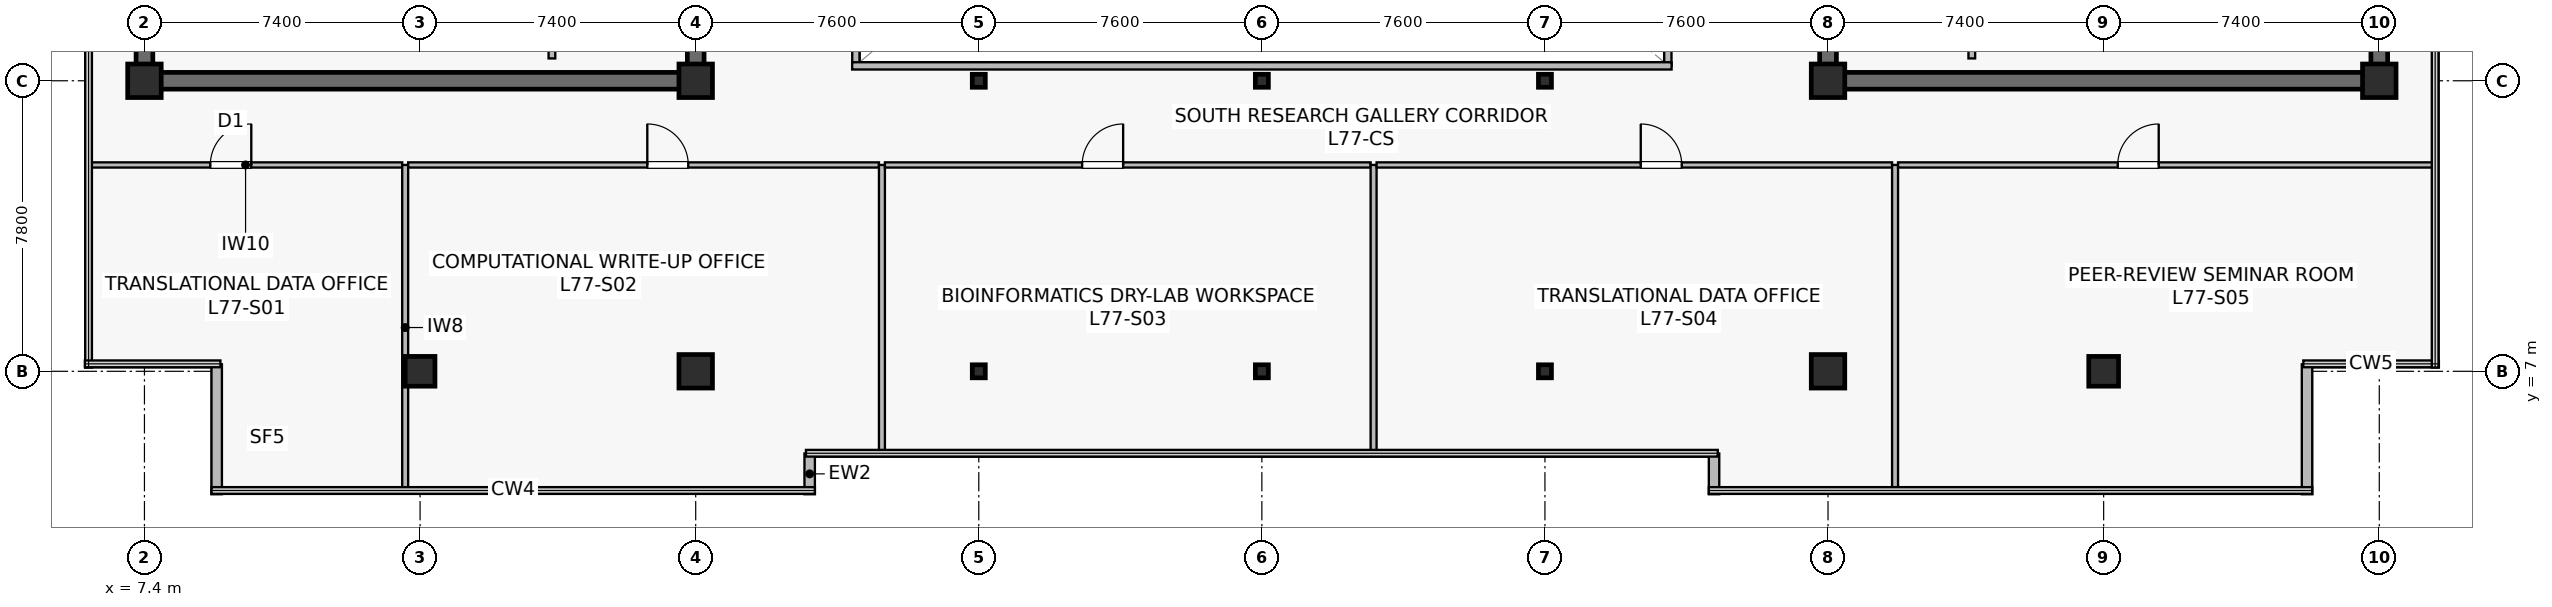
"""IFC4 building model, lengths in metres.
Left out: names, types, materials, properties, quantities, classifications, styles, units other than length and angle.
Written with IfcOpenShell. Run it as: python <this file> out.ifc"""

import sys

from ifc_helpers import new_model, si_unit, direction, frame, frame_2d, origin, origin_2d, place, context, subcontext, project, spatial, rectangle, i_section, extrude, source, transform, mapped, element, fill, save


model = new_model("IFC4")
c1 = context("Model", 3, precision=1e-05, world=origin(), true_north=direction((0.0, 1.0)))
c2 = subcontext(c1, "Body", "Model", "MODEL_VIEW")
j1 = project(units=[si_unit("LENGTHUNIT", "METRE"), si_unit("PLANEANGLEUNIT", "RADIAN")], contexts=[c1])
p1 = place(None, origin())
s1 = spatial("IfcSite", under=j1, at=p1, CompositionType="ELEMENT")
p2 = place(p1, origin())
s2 = spatial("IfcBuilding", under=s1, at=p2, CompositionType="ELEMENT")
p3 = place(p2, frame((0.0, 0.0, 322.8)))
s3 = spatial("IfcBuildingStorey", under=s2, at=p3, CompositionType="ELEMENT", Elevation=322.8)
p4 = place(p3, frame((7.175, 14.8, 0.0), z_axis=(0.0, 0.0, 1.0), x_axis=(1.0, 0.0, 0.0)))
e1 = element("IfcWall", 1, at=p4, inside=s3, PredefinedType="SHEAR", context=c2, shape_type="SweptSolid", body=[
    extrude(rectangle(XDim=15.25, YDim=0.45, at=frame_2d((7.625, 0.0))), origin(), (0.0, 0.0, 1.0), 3.92),
])
p5 = place(p3, frame((7.4, 15.025, 0.0), z_axis=(0.0, 0.0, 1.0), x_axis=(0.0, 1.0, 0.0)))
e2 = element("IfcWall", 2, at=p5, inside=s3, PredefinedType="SHEAR", context=c2, shape_type="SweptSolid", body=[
    extrude(rectangle(XDim=18.55, YDim=0.45, at=frame_2d((9.275, 0.0))), origin(), (0.0, 0.0, 1.0), 3.92),
])
p6 = place(p3, frame((22.2, 15.025, 0.0), z_axis=(0.0, 0.0, 1.0), x_axis=(0.0, 1.0, 0.0)))
e3 = element("IfcWall", 3, at=p6, inside=s3, PredefinedType="SHEAR", context=c2, shape_type="SweptSolid", body=[
    extrude(rectangle(XDim=18.55, YDim=0.45, at=frame_2d((9.275, 0.0))), origin(), (0.0, 0.0, 1.0), 3.92),
])
p7 = place(p6, frame((3.525, 0.0, 0.0)))
e4 = element("IfcOpeningElement", 4, at=p7, cuts=e3, PredefinedType="OPENING", context=c2, shape_type="SweptSolid", body=[
    extrude(rectangle(XDim=1.42, YDim=2.2, at=frame_2d((0.71, 1.1))), frame((0.0, 0.235, 0.0), z_axis=(0.0, -1.0, 0.0), x_axis=(1.0, 0.0, 0.0)), (0.0, 0.0, 1.0), 0.47),
])
p8 = place(p3, frame((52.375, 14.8, 0.0), z_axis=(0.0, 0.0, 1.0), x_axis=(1.0, 0.0, 0.0)))
e5 = element("IfcWall", 5, at=p8, inside=s3, PredefinedType="SHEAR", context=c2, shape_type="SweptSolid", body=[
    extrude(rectangle(XDim=15.25, YDim=0.45, at=frame_2d((7.625, 0.0))), origin(), (0.0, 0.0, 1.0), 3.92),
])
p9 = place(p3, frame((52.6, 15.025, 0.0), z_axis=(0.0, 0.0, 1.0), x_axis=(0.0, 1.0, 0.0)))
e6 = element("IfcWall", 6, at=p9, inside=s3, PredefinedType="SHEAR", context=c2, shape_type="SweptSolid", body=[
    extrude(rectangle(XDim=18.55, YDim=0.45, at=frame_2d((9.275, 0.0))), origin(), (0.0, 0.0, 1.0), 3.92),
])
p10 = place(p9, frame((3.525, 0.0, 0.0)))
e7 = element("IfcOpeningElement", 7, at=p10, cuts=e6, PredefinedType="OPENING", context=c2, shape_type="SweptSolid", body=[
    extrude(rectangle(XDim=1.42, YDim=2.2, at=frame_2d((0.71, 1.1))), frame((0.0, 0.235, 0.0), z_axis=(0.0, -1.0, 0.0), x_axis=(1.0, 0.0, 0.0)), (0.0, 0.0, 1.0), 0.47),
])
p11 = place(p3, frame((67.4, 15.025, 0.0), z_axis=(0.0, 0.0, 1.0), x_axis=(0.0, 1.0, 0.0)))
e8 = element("IfcWall", 8, at=p11, inside=s3, PredefinedType="SHEAR", context=c2, shape_type="SweptSolid", body=[
    extrude(rectangle(XDim=18.55, YDim=0.45, at=frame_2d((9.275, 0.0))), origin(), (0.0, 0.0, 1.0), 3.92),
])
m1 = source(origin(), c2, "Body", "SweptSolid", [
    extrude(rectangle(XDim=0.8, YDim=0.8, at=origin_2d()), origin(), (0.0, 0.0, 1.0), 4.2),
])
p12 = place(p3, frame((14.8, 7.0, 0.0), z_axis=(0.0, 0.0, 1.0), x_axis=(1.0, 0.0, 0.0)))
e9 = element("IfcColumn", 9, at=p12, inside=s3, PredefinedType="COLUMN", context=c2, shape_type="MappedRepresentation", body=[
    mapped(m1, transform((0.0, 0.0, 0.0), scale=1.0)),
])
m2 = source(origin(), c2, "Body", "SweptSolid", [
    extrude(rectangle(XDim=0.9, YDim=0.9, at=origin_2d()), origin(), (0.0, 0.0, 1.0), 4.2),
])
for number, where, z_axis, x_axis in (
    (10, (22.2, 7.0, 0.0), (0.0, 0.0, 1.0), (1.0, 0.0, 0.0)),
    (11, (7.4, 14.8, 0.0), (0.0, 0.0, 1.0), (1.0, 0.0, 0.0)),
    (12, (22.2, 14.8, 0.0), (0.0, 0.0, 1.0), (1.0, 0.0, 0.0)),
    (13, (52.6, 7.0, 0.0), (0.0, 0.0, 1.0), (1.0, 0.0, 0.0)),
):
    element("IfcColumn", number, at=place(p3, frame(where, z_axis=z_axis, x_axis=x_axis)), inside=s3, PredefinedType="COLUMN", context=c2, shape_type="MappedRepresentation", body=[
        mapped(m2, transform((0.0, 0.0, 0.0), scale=1.0)),
    ])
p13 = place(p3, frame((60.0, 7.0, 0.0), z_axis=(0.0, 0.0, 1.0), x_axis=(1.0, 0.0, 0.0)))
e14 = element("IfcColumn", 14, at=p13, inside=s3, PredefinedType="COLUMN", context=c2, shape_type="MappedRepresentation", body=[
    mapped(m1, transform((0.0, 0.0, 0.0), scale=1.0)),
])
for number, where, z_axis, x_axis in (
    (15, (52.6, 14.8, 0.0), (0.0, 0.0, 1.0), (1.0, 0.0, 0.0)),
    (16, (67.4, 14.8, 0.0), (0.0, 0.0, 1.0), (1.0, 0.0, 0.0)),
):
    element("IfcColumn", number, at=place(p3, frame(where, z_axis=z_axis, x_axis=x_axis)), inside=s3, PredefinedType="COLUMN", context=c2, shape_type="MappedRepresentation", body=[
        mapped(m2, transform((0.0, 0.0, 0.0), scale=1.0)),
    ])
m3 = source(origin(), c2, "Body", "SweptSolid", [
    extrude(i_section(OverallWidth=0.35, OverallDepth=0.35, WebThickness=0.012, FlangeThickness=0.019, at=origin_2d()), origin(), (0.0, 0.0, 1.0), 4.2),
])
for number, where, z_axis, x_axis in (
    (17, (29.8, 7.0, 0.0), (0.0, 0.0, 1.0), (1.0, 0.0, 0.0)),
    (18, (29.8, 14.8, 0.0), (0.0, 0.0, 1.0), (1.0, 0.0, 0.0)),
    (19, (37.4, 7.0, 0.0), (0.0, 0.0, 1.0), (1.0, 0.0, 0.0)),
    (20, (37.4, 14.8, 0.0), (0.0, 0.0, 1.0), (1.0, 0.0, 0.0)),
    (21, (45.0, 7.0, 0.0), (0.0, 0.0, 1.0), (1.0, 0.0, 0.0)),
    (22, (45.0, 14.8, 0.0), (0.0, 0.0, 1.0), (1.0, 0.0, 0.0)),
):
    element("IfcColumn", number, at=place(p3, frame(where, z_axis=z_axis, x_axis=x_axis)), inside=s3, PredefinedType="COLUMN", context=c2, shape_type="MappedRepresentation", body=[
        mapped(m3, transform((0.0, 0.0, 0.0), scale=1.0)),
    ])
for number, where, z_axis, x_axis in (
    (23, (25.26, 3.7, 0.0), (0.0, 0.0, 1.0), (0.0, 1.0, 0.0)),
    (24, (49.54, 4.793, 0.0), (0.0, 0.0, 1.0), (0.0, -1.0, 0.0)),
):
    element("IfcWall", number, at=place(p3, frame(where, z_axis=z_axis, x_axis=x_axis)), inside=s3, PredefinedType="STANDARD", context=c2, shape_type="SweptSolid", body=[
        extrude(rectangle(XDim=1.093, YDim=0.28, at=frame_2d((0.546, 0.0))), origin(), (0.0, 0.0, 1.0), 3.92),
    ])
for number, where, z_axis, x_axis in (
    (25, (65.46, 3.7, 0.0), (0.0, 0.0, 1.0), (0.0, 1.0, 0.0)),
    (26, (9.34, 7.188, 0.0), (0.0, 0.0, 1.0), (0.0, -1.0, 0.0)),
):
    element("IfcWall", number, at=place(p3, frame(where, z_axis=z_axis, x_axis=x_axis)), inside=s3, PredefinedType="STANDARD", context=c2, shape_type="SweptSolid", body=[
        extrude(rectangle(XDim=3.488, YDim=0.28, at=frame_2d((1.744, 0.0))), origin(), (0.0, 0.0, 1.0), 3.92),
    ])
for number, where, z_axis, x_axis in (
    (27, (18.34, 15.4, 0.0), (0.0, 0.0, 1.0), (0.0, 1.0, 0.0)),
    (28, (56.46, 15.4, 0.0), (0.0, 0.0, 1.0), (0.0, 1.0, 0.0)),
):
    element("IfcWall", number, at=place(p3, frame(where, z_axis=z_axis, x_axis=x_axis)), inside=s3, PredefinedType="SOLIDWALL", context=c2, shape_type="SweptSolid", body=[
        extrude(rectangle(XDim=2.4, YDim=0.18, at=frame_2d((1.2, 0.0))), origin(), (0.0, 0.0, 1.0), 3.92),
    ])
p14 = place(p3, frame((26.5, 15.2, 0.0), z_axis=(0.0, 0.0, 1.0), x_axis=(0.0, 1.0, 0.0)))
e29 = element("IfcWall", 29, at=p14, inside=s3, PredefinedType="SOLIDWALL", context=c2, shape_type="SweptSolid", body=[
    extrude(rectangle(XDim=18.2, YDim=0.195, at=frame_2d((9.1, 0.0))), origin(), (0.0, 0.0, 1.0), 3.92),
])
p15 = place(p14, frame((1.8, 0.0, 0.9)))
e30 = element("IfcOpeningElement", 30, at=p15, cuts=e29, PredefinedType="OPENING", context=c2, shape_type="SweptSolid", body=[
    extrude(rectangle(XDim=1.2, YDim=1.35, at=frame_2d((0.6, 0.675))), frame((0.0, 0.107, 0.0), z_axis=(0.0, -1.0, 0.0), x_axis=(1.0, 0.0, 0.0)), (0.0, 0.0, 1.0), 0.215),
])
p16 = place(p14, frame((13.2, 0.0, 0.9)))
e31 = element("IfcOpeningElement", 31, at=p16, cuts=e29, PredefinedType="OPENING", context=c2, shape_type="SweptSolid", body=[
    extrude(rectangle(XDim=1.2, YDim=1.35, at=frame_2d((0.6, 0.675))), frame((0.0, 0.107, 0.0), z_axis=(0.0, -1.0, 0.0), x_axis=(1.0, 0.0, 0.0)), (0.0, 0.0, 1.0), 0.215),
])
p17 = place(p3, frame((48.3, 15.2, 0.0), z_axis=(0.0, 0.0, 1.0), x_axis=(0.0, 1.0, 0.0)))
e32 = element("IfcWall", 32, at=p17, inside=s3, PredefinedType="SOLIDWALL", context=c2, shape_type="SweptSolid", body=[
    extrude(rectangle(XDim=18.2, YDim=0.195, at=frame_2d((9.1, 0.0))), origin(), (0.0, 0.0, 1.0), 3.92),
])
p18 = place(p17, frame((1.8, 0.0, 0.9)))
e33 = element("IfcOpeningElement", 33, at=p18, cuts=e32, PredefinedType="OPENING", context=c2, shape_type="SweptSolid", body=[
    extrude(rectangle(XDim=1.2, YDim=1.35, at=frame_2d((0.6, 0.675))), frame((0.0, 0.107, 0.0), z_axis=(0.0, -1.0, 0.0), x_axis=(1.0, 0.0, 0.0)), (0.0, 0.0, 1.0), 0.215),
])
p19 = place(p17, frame((13.2, 0.0, 0.9)))
e34 = element("IfcOpeningElement", 34, at=p19, cuts=e32, PredefinedType="OPENING", context=c2, shape_type="SweptSolid", body=[
    extrude(rectangle(XDim=1.2, YDim=1.35, at=frame_2d((0.6, 0.675))), frame((0.0, 0.107, 0.0), z_axis=(0.0, -1.0, 0.0), x_axis=(1.0, 0.0, 0.0)), (0.0, 0.0, 1.0), 0.215),
])
p20 = place(p3, frame((26.4, 15.2, 0.0), z_axis=(0.0, 0.0, 1.0), x_axis=(1.0, 0.0, 0.0)))
e35 = element("IfcWall", 35, at=p20, inside=s3, PredefinedType="SOLIDWALL", context=c2, shape_type="SweptSolid", body=[
    extrude(rectangle(XDim=22.0, YDim=0.195, at=frame_2d((11.0, 0.0))), origin(), (0.0, 0.0, 1.0), 3.92),
])
p21 = place(p3, frame((5.91, 12.54, 0.0), z_axis=(0.0, 0.0, 1.0), x_axis=(1.0, 0.0, 0.0)))
e36 = element("IfcWall", 36, at=p21, inside=s3, PredefinedType="PARTITIONING", context=c2, shape_type="SweptSolid", body=[
    extrude(rectangle(XDim=8.41, YDim=0.14, at=frame_2d((4.205, 0.0))), origin(), (0.0, 0.0, 1.0), 3.92),
])
p22 = place(p21, frame((3.258, 0.0, 0.0)))
e37 = element("IfcOpeningElement", 37, at=p22, cuts=e36, PredefinedType="OPENING", context=c2, shape_type="SweptSolid", body=[
    extrude(rectangle(XDim=1.1, YDim=2.18, at=frame_2d((0.55, 1.09))), frame((0.0, 0.08, 0.0), z_axis=(0.0, -1.0, 0.0), x_axis=(1.0, 0.0, 0.0)), (0.0, 0.0, 1.0), 0.16),
])
p23 = place(p3, frame((14.4, 3.81, 0.0), z_axis=(0.0, 0.0, 1.0), x_axis=(0.0, 1.0, 0.0)))
e38 = element("IfcWall", 38, at=p23, inside=s3, PredefinedType="PARTITIONING", context=c2, shape_type="SweptSolid", body=[
    extrude(rectangle(XDim=8.73, YDim=0.16, at=frame_2d((4.365, 0.0))), origin(), (0.0, 0.0, 1.0), 3.92),
])
p24 = place(p3, frame((14.48, 12.54, 0.0), z_axis=(0.0, 0.0, 1.0), x_axis=(1.0, 0.0, 0.0)))
e39 = element("IfcWall", 39, at=p24, inside=s3, PredefinedType="PARTITIONING", context=c2, shape_type="SweptSolid", body=[
    extrude(rectangle(XDim=12.64, YDim=0.14, at=frame_2d((6.32, 0.0))), origin(), (0.0, 0.0, 1.0), 3.317),
])
p25 = place(p24, frame((6.42, 0.0, 0.0)))
e40 = element("IfcOpeningElement", 40, at=p25, cuts=e39, PredefinedType="OPENING", context=c2, shape_type="SweptSolid", body=[
    extrude(rectangle(XDim=1.1, YDim=2.18, at=frame_2d((0.55, 1.09))), frame((0.0, 0.08, 0.0), z_axis=(0.0, -1.0, 0.0), x_axis=(1.0, 0.0, 0.0)), (0.0, 0.0, 1.0), 0.16),
])
p26 = place(p3, frame((27.2, 4.81, 0.0), z_axis=(0.0, 0.0, 1.0), x_axis=(0.0, 1.0, 0.0)))
e41 = element("IfcWall", 41, at=p26, inside=s3, PredefinedType="PARTITIONING", context=c2, shape_type="SweptSolid", body=[
    extrude(rectangle(XDim=7.73, YDim=0.16, at=frame_2d((3.865, 0.0))), origin(), (0.0, 0.0, 1.0), 3.255),
])
p27 = place(p3, frame((27.28, 12.54, 0.0), z_axis=(0.0, 0.0, 1.0), x_axis=(1.0, 0.0, 0.0)))
e42 = element("IfcWall", 42, at=p27, inside=s3, PredefinedType="PARTITIONING", context=c2, shape_type="SweptSolid", body=[
    extrude(rectangle(XDim=13.04, YDim=0.14, at=frame_2d((6.52, 0.0))), origin(), (0.0, 0.0, 1.0), 3.317),
])
p28 = place(p27, frame((5.296, 0.0, 0.0)))
e43 = element("IfcOpeningElement", 43, at=p28, cuts=e42, PredefinedType="OPENING", context=c2, shape_type="SweptSolid", body=[
    extrude(rectangle(XDim=1.1, YDim=2.18, at=frame_2d((0.55, 1.09))), frame((0.0, 0.08, 0.0), z_axis=(0.0, -1.0, 0.0), x_axis=(1.0, 0.0, 0.0)), (0.0, 0.0, 1.0), 0.16),
])
p29 = place(p3, frame((40.4, 4.81, 0.0), z_axis=(0.0, 0.0, 1.0), x_axis=(0.0, 1.0, 0.0)))
e44 = element("IfcWall", 44, at=p29, inside=s3, PredefinedType="PARTITIONING", context=c2, shape_type="SweptSolid", body=[
    extrude(rectangle(XDim=7.73, YDim=0.16, at=frame_2d((3.865, 0.0))), origin(), (0.0, 0.0, 1.0), 3.255),
])
p30 = place(p3, frame((40.48, 12.54, 0.0), z_axis=(0.0, 0.0, 1.0), x_axis=(1.0, 0.0, 0.0)))
e45 = element("IfcWall", 45, at=p30, inside=s3, PredefinedType="PARTITIONING", context=c2, shape_type="SweptSolid", body=[
    extrude(rectangle(XDim=13.84, YDim=0.14, at=frame_2d((6.92, 0.0))), origin(), (0.0, 0.0, 1.0), 3.317),
])
p31 = place(p30, frame((7.092, 0.0, 0.0)))
e46 = element("IfcOpeningElement", 46, at=p31, cuts=e45, PredefinedType="OPENING", context=c2, shape_type="SweptSolid", body=[
    extrude(rectangle(XDim=1.1, YDim=2.18, at=frame_2d((0.55, 1.09))), frame((0.0, 0.08, 0.0), z_axis=(0.0, -1.0, 0.0), x_axis=(1.0, 0.0, 0.0)), (0.0, 0.0, 1.0), 0.16),
])
p32 = place(p3, frame((54.4, 3.81, 0.0), z_axis=(0.0, 0.0, 1.0), x_axis=(0.0, 1.0, 0.0)))
e47 = element("IfcWall", 47, at=p32, inside=s3, PredefinedType="PARTITIONING", context=c2, shape_type="SweptSolid", body=[
    extrude(rectangle(XDim=8.73, YDim=0.16, at=frame_2d((4.365, 0.0))), origin(), (0.0, 0.0, 1.0), 3.255),
])
p33 = place(p3, frame((54.48, 12.54, 0.0), z_axis=(0.0, 0.0, 1.0), x_axis=(1.0, 0.0, 0.0)))
e48 = element("IfcWall", 48, at=p33, inside=s3, PredefinedType="PARTITIONING", context=c2, shape_type="SweptSolid", body=[
    extrude(rectangle(XDim=14.41, YDim=0.14, at=frame_2d((7.205, 0.0))), origin(), (0.0, 0.0, 1.0), 3.317),
])
p34 = place(p33, frame((5.898, 0.0, 0.0)))
e49 = element("IfcOpeningElement", 49, at=p34, cuts=e48, PredefinedType="OPENING", context=c2, shape_type="SweptSolid", body=[
    extrude(rectangle(XDim=1.1, YDim=2.18, at=frame_2d((0.55, 1.09))), frame((0.0, 0.08, 0.0), z_axis=(0.0, -1.0, 0.0), x_axis=(1.0, 0.0, 0.0)), (0.0, 0.0, 1.0), 0.16),
])
m4 = source(origin(), c2, "Body", "SweptSolid", [
    extrude(rectangle(XDim=1.1, YDim=2.18, at=frame_2d((0.55, 1.09))), frame((0.0, 0.025, 0.0), z_axis=(0.0, -1.0, 0.0), x_axis=(1.0, 0.0, 0.0)), (0.0, 0.0, 1.0), 0.05),
])
p35 = place(p22, origin())
e50 = element("IfcDoor", 50, at=p35, inside=s3, OperationType="SINGLE_SWING_RIGHT", PredefinedType="DOOR", context=c2, shape_type="MappedRepresentation", body=[
    mapped(m4, transform((0.0, 0.0, 0.0), scale=1.0)),
])
fill(e37, e50)
p36 = place(p25, origin())
e51 = element("IfcDoor", 51, at=p36, inside=s3, OperationType="SINGLE_SWING_LEFT", PredefinedType="DOOR", context=c2, shape_type="MappedRepresentation", body=[
    mapped(m4, transform((0.0, 0.0, 0.0), scale=1.0)),
])
fill(e40, e51)
p37 = place(p28, origin())
e52 = element("IfcDoor", 52, at=p37, inside=s3, OperationType="SINGLE_SWING_RIGHT", PredefinedType="DOOR", context=c2, shape_type="MappedRepresentation", body=[
    mapped(m4, transform((0.0, 0.0, 0.0), scale=1.0)),
])
fill(e43, e52)
p38 = place(p31, origin())
e53 = element("IfcDoor", 53, at=p38, inside=s3, OperationType="SINGLE_SWING_LEFT", PredefinedType="DOOR", context=c2, shape_type="MappedRepresentation", body=[
    mapped(m4, transform((0.0, 0.0, 0.0), scale=1.0)),
])
fill(e46, e53)
p39 = place(p34, origin())
e54 = element("IfcDoor", 54, at=p39, inside=s3, OperationType="SINGLE_SWING_RIGHT", PredefinedType="DOOR", context=c2, shape_type="MappedRepresentation", body=[
    mapped(m4, transform((0.0, 0.0, 0.0), scale=1.0)),
])
fill(e49, e54)
save(model, sys.argv[1])
